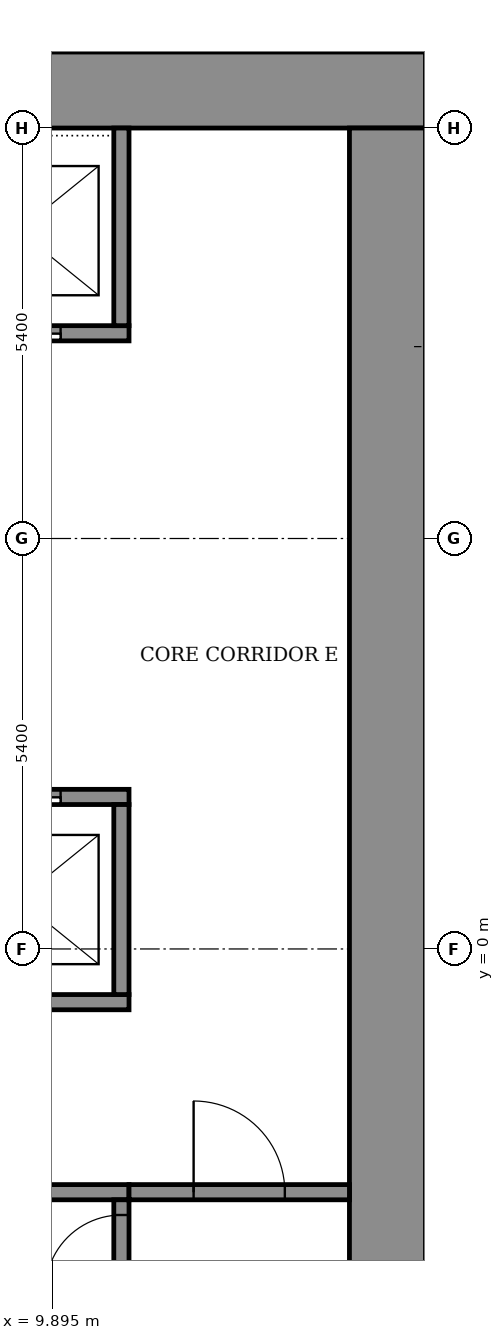
"""IFC4 building model, lengths in metres.
Left out: names, types, materials, properties, quantities, classifications, styles, units other than length and angle.
Written with IfcOpenShell. Run it as: python <this file> out.ifc"""

import sys

from ifc_helpers import new_model, si_unit, direction, frame, frame_2d, origin, place, context, subcontext, project, spatial, rectangle, extrude, element, fill, save


model = new_model("IFC4")
c1 = context("Model", 3, precision=1e-05, world=origin(), true_north=direction((0.0, 1.0)))
c2 = subcontext(c1, "Body", "Model", "MODEL_VIEW")
j1 = project(units=[si_unit("LENGTHUNIT", "METRE"), si_unit("PLANEANGLEUNIT", "RADIAN")], contexts=[c1])
p1 = place(None, origin())
s1 = spatial("IfcSite", under=j1, at=p1, CompositionType="ELEMENT")
p2 = place(p1, origin())
s2 = spatial("IfcBuilding", under=s1, at=p2, CompositionType="ELEMENT")
p3 = place(p2, frame((0.0, 0.0, 119.9)))
s3 = spatial("IfcBuildingStorey", under=s2, at=p3, CompositionType="ELEMENT", Elevation=119.9)
p4 = place(p3, frame((-14.8, 11.3, 0.0), z_axis=(0.0, 0.0, 1.0), x_axis=(1.0, 0.0, 0.0)))
e1 = element("IfcWall", 1, at=p4, inside=s3, PredefinedType="SHEAR", context=c2, shape_type="SweptSolid", body=[
    extrude(rectangle(XDim=29.6, YDim=1.0, at=frame_2d((14.8, 0.0))), origin(), (0.0, 0.0, 1.0), 5.6),
])
p5 = place(p3, frame((14.3, -10.8, 0.0), z_axis=(0.0, 0.0, 1.0), x_axis=(0.0, 1.0, 0.0)))
e2 = element("IfcWall", 2, at=p5, inside=s3, PredefinedType="SHEAR", context=c2, shape_type="SweptSolid", body=[
    extrude(rectangle(XDim=21.6, YDim=1.0, at=frame_2d((10.8, 0.0))), origin(), (0.0, 0.0, 1.0), 5.6),
])
p6 = place(p5, frame((1.2, 0.0, 0.0)))
e3 = element("IfcOpeningElement", 3, at=p6, cuts=e2, PredefinedType="OPENING", context=c2, shape_type="SweptSolid", body=[
    extrude(rectangle(XDim=1.2, YDim=2.1, at=frame_2d((0.6, 1.05))), frame((0.0, 0.51, 0.0), z_axis=(0.0, -1.0, 0.0), x_axis=(1.0, 0.0, 0.0)), (0.0, 0.0, 1.0), 1.02),
])
p7 = place(p3, frame((-10.9, -3.2, 0.0), z_axis=(0.0, 0.0, 1.0), x_axis=(1.0, 0.0, 0.0)))
e4 = element("IfcWall", 4, at=p7, inside=s3, PredefinedType="SHEAR", context=c2, shape_type="SweptSolid", body=[
    extrude(rectangle(XDim=21.8, YDim=0.2, at=frame_2d((10.9, 0.0))), origin(), (0.0, 0.0, 1.0), 5.05),
])
p8 = place(p7, frame((1.075, 0.0, 0.0)))
e5 = element("IfcOpeningElement", 5, at=p8, cuts=e4, PredefinedType="OPENING", context=c2, shape_type="SweptSolid", body=[
    extrude(rectangle(XDim=1.1, YDim=2.1, at=frame_2d((0.55, 1.05))), frame((0.0, 0.11, 0.0), z_axis=(0.0, -1.0, 0.0), x_axis=(1.0, 0.0, 0.0)), (0.0, 0.0, 1.0), 0.22),
])
p9 = place(p7, frame((10.325, 0.0, 0.0)))
e6 = element("IfcOpeningElement", 6, at=p9, cuts=e4, PredefinedType="OPENING", context=c2, shape_type="SweptSolid", body=[
    extrude(rectangle(XDim=1.1, YDim=2.1, at=frame_2d((0.55, 1.05))), frame((0.0, 0.11, 0.0), z_axis=(0.0, -1.0, 0.0), x_axis=(1.0, 0.0, 0.0)), (0.0, 0.0, 1.0), 0.22),
])
p10 = place(p7, frame((19.625, 0.0, 0.0)))
e7 = element("IfcOpeningElement", 7, at=p10, cuts=e4, PredefinedType="OPENING", context=c2, shape_type="SweptSolid", body=[
    extrude(rectangle(XDim=1.1, YDim=2.1, at=frame_2d((0.55, 1.05))), frame((0.0, 0.11, 0.0), z_axis=(0.0, -1.0, 0.0), x_axis=(1.0, 0.0, 0.0)), (0.0, 0.0, 1.0), 0.22),
])
p11 = place(p7, frame((5.7, 0.0, 0.0)))
e8 = element("IfcOpeningElement", 8, at=p11, cuts=e4, PredefinedType="OPENING", context=c2, shape_type="SweptSolid", body=[
    extrude(rectangle(XDim=1.1, YDim=2.1, at=frame_2d((0.55, 1.05))), frame((0.0, 0.11, 0.0), z_axis=(0.0, -1.0, 0.0), x_axis=(1.0, 0.0, 0.0)), (0.0, 0.0, 1.0), 0.22),
])
p12 = place(p7, frame((14.975, 0.0, 0.0)))
e9 = element("IfcOpeningElement", 9, at=p12, cuts=e4, PredefinedType="OPENING", context=c2, shape_type="SweptSolid", body=[
    extrude(rectangle(XDim=1.1, YDim=2.1, at=frame_2d((0.55, 1.05))), frame((0.0, 0.11, 0.0), z_axis=(0.0, -1.0, 0.0), x_axis=(1.0, 0.0, 0.0)), (0.0, 0.0, 1.0), 0.22),
])
p13 = place(p3, frame((-10.9, -0.7, 0.0), z_axis=(0.0, 0.0, 1.0), x_axis=(1.0, 0.0, 0.0)))
e10 = element("IfcWall", 10, at=p13, inside=s3, PredefinedType="SHEAR", context=c2, shape_type="SweptSolid", body=[
    extrude(rectangle(XDim=21.8, YDim=0.2, at=frame_2d((10.9, 0.0))), origin(), (0.0, 0.0, 1.0), 5.05),
])
p14 = place(p3, frame((-10.9, 2.0, 0.0), z_axis=(0.0, 0.0, 1.0), x_axis=(1.0, 0.0, 0.0)))
e11 = element("IfcWall", 11, at=p14, inside=s3, PredefinedType="SHEAR", context=c2, shape_type="SweptSolid", body=[
    extrude(rectangle(XDim=21.8, YDim=0.2, at=frame_2d((10.9, 0.0))), origin(), (0.0, 0.0, 1.0), 5.05),
])
p15 = place(p14, frame((0.9, 0.0, 0.0)))
e12 = element("IfcOpeningElement", 12, at=p15, cuts=e11, PredefinedType="OPENING", context=c2, shape_type="SweptSolid", body=[
    extrude(rectangle(XDim=1.1, YDim=2.1, at=frame_2d((0.55, 1.05))), frame((0.0, 0.11, 0.0), z_axis=(0.0, -1.0, 0.0), x_axis=(1.0, 0.0, 0.0)), (0.0, 0.0, 1.0), 0.22),
])
p16 = place(p14, frame((3.6, 0.0, 0.0)))
e13 = element("IfcOpeningElement", 13, at=p16, cuts=e11, PredefinedType="OPENING", context=c2, shape_type="SweptSolid", body=[
    extrude(rectangle(XDim=1.1, YDim=2.1, at=frame_2d((0.55, 1.05))), frame((0.0, 0.11, 0.0), z_axis=(0.0, -1.0, 0.0), x_axis=(1.0, 0.0, 0.0)), (0.0, 0.0, 1.0), 0.22),
])
p17 = place(p14, frame((6.3, 0.0, 0.0)))
e14 = element("IfcOpeningElement", 14, at=p17, cuts=e11, PredefinedType="OPENING", context=c2, shape_type="SweptSolid", body=[
    extrude(rectangle(XDim=1.1, YDim=2.1, at=frame_2d((0.55, 1.05))), frame((0.0, 0.11, 0.0), z_axis=(0.0, -1.0, 0.0), x_axis=(1.0, 0.0, 0.0)), (0.0, 0.0, 1.0), 0.22),
])
p18 = place(p14, frame((9.0, 0.0, 0.0)))
e15 = element("IfcOpeningElement", 15, at=p18, cuts=e11, PredefinedType="OPENING", context=c2, shape_type="SweptSolid", body=[
    extrude(rectangle(XDim=1.1, YDim=2.1, at=frame_2d((0.55, 1.05))), frame((0.0, 0.11, 0.0), z_axis=(0.0, -1.0, 0.0), x_axis=(1.0, 0.0, 0.0)), (0.0, 0.0, 1.0), 0.22),
])
p19 = place(p14, frame((11.7, 0.0, 0.0)))
e16 = element("IfcOpeningElement", 16, at=p19, cuts=e11, PredefinedType="OPENING", context=c2, shape_type="SweptSolid", body=[
    extrude(rectangle(XDim=1.1, YDim=2.1, at=frame_2d((0.55, 1.05))), frame((0.0, 0.11, 0.0), z_axis=(0.0, -1.0, 0.0), x_axis=(1.0, 0.0, 0.0)), (0.0, 0.0, 1.0), 0.22),
])
p20 = place(p14, frame((14.4, 0.0, 0.0)))
e17 = element("IfcOpeningElement", 17, at=p20, cuts=e11, PredefinedType="OPENING", context=c2, shape_type="SweptSolid", body=[
    extrude(rectangle(XDim=1.1, YDim=2.1, at=frame_2d((0.55, 1.05))), frame((0.0, 0.11, 0.0), z_axis=(0.0, -1.0, 0.0), x_axis=(1.0, 0.0, 0.0)), (0.0, 0.0, 1.0), 0.22),
])
p21 = place(p14, frame((17.1, 0.0, 0.0)))
e18 = element("IfcOpeningElement", 18, at=p21, cuts=e11, PredefinedType="OPENING", context=c2, shape_type="SweptSolid", body=[
    extrude(rectangle(XDim=1.1, YDim=2.1, at=frame_2d((0.55, 1.05))), frame((0.0, 0.11, 0.0), z_axis=(0.0, -1.0, 0.0), x_axis=(1.0, 0.0, 0.0)), (0.0, 0.0, 1.0), 0.22),
])
p22 = place(p14, frame((19.8, 0.0, 0.0)))
e19 = element("IfcOpeningElement", 19, at=p22, cuts=e11, PredefinedType="OPENING", context=c2, shape_type="SweptSolid", body=[
    extrude(rectangle(XDim=1.1, YDim=2.1, at=frame_2d((0.55, 1.05))), frame((0.0, 0.11, 0.0), z_axis=(0.0, -1.0, 0.0), x_axis=(1.0, 0.0, 0.0)), (0.0, 0.0, 1.0), 0.22),
])
p23 = place(p3, frame((-10.9, 8.1, 0.0), z_axis=(0.0, 0.0, 1.0), x_axis=(1.0, 0.0, 0.0)))
e20 = element("IfcWall", 20, at=p23, inside=s3, PredefinedType="SHEAR", context=c2, shape_type="SweptSolid", body=[
    extrude(rectangle(XDim=21.8, YDim=0.2, at=frame_2d((10.9, 0.0))), origin(), (0.0, 0.0, 1.0), 5.05),
])
p24 = place(p23, frame((0.9, 0.0, 0.0)))
e21 = element("IfcOpeningElement", 21, at=p24, cuts=e20, PredefinedType="OPENING", context=c2, shape_type="SweptSolid", body=[
    extrude(rectangle(XDim=1.1, YDim=2.1, at=frame_2d((0.55, 1.05))), frame((0.0, 0.11, 0.0), z_axis=(0.0, -1.0, 0.0), x_axis=(1.0, 0.0, 0.0)), (0.0, 0.0, 1.0), 0.22),
])
p25 = place(p23, frame((3.6, 0.0, 0.0)))
e22 = element("IfcOpeningElement", 22, at=p25, cuts=e20, PredefinedType="OPENING", context=c2, shape_type="SweptSolid", body=[
    extrude(rectangle(XDim=1.1, YDim=2.1, at=frame_2d((0.55, 1.05))), frame((0.0, 0.11, 0.0), z_axis=(0.0, -1.0, 0.0), x_axis=(1.0, 0.0, 0.0)), (0.0, 0.0, 1.0), 0.22),
])
p26 = place(p23, frame((6.3, 0.0, 0.0)))
e23 = element("IfcOpeningElement", 23, at=p26, cuts=e20, PredefinedType="OPENING", context=c2, shape_type="SweptSolid", body=[
    extrude(rectangle(XDim=1.1, YDim=2.1, at=frame_2d((0.55, 1.05))), frame((0.0, 0.11, 0.0), z_axis=(0.0, -1.0, 0.0), x_axis=(1.0, 0.0, 0.0)), (0.0, 0.0, 1.0), 0.22),
])
p27 = place(p23, frame((9.0, 0.0, 0.0)))
e24 = element("IfcOpeningElement", 24, at=p27, cuts=e20, PredefinedType="OPENING", context=c2, shape_type="SweptSolid", body=[
    extrude(rectangle(XDim=1.1, YDim=2.1, at=frame_2d((0.55, 1.05))), frame((0.0, 0.11, 0.0), z_axis=(0.0, -1.0, 0.0), x_axis=(1.0, 0.0, 0.0)), (0.0, 0.0, 1.0), 0.22),
])
p28 = place(p23, frame((11.7, 0.0, 0.0)))
e25 = element("IfcOpeningElement", 25, at=p28, cuts=e20, PredefinedType="OPENING", context=c2, shape_type="SweptSolid", body=[
    extrude(rectangle(XDim=1.1, YDim=2.1, at=frame_2d((0.55, 1.05))), frame((0.0, 0.11, 0.0), z_axis=(0.0, -1.0, 0.0), x_axis=(1.0, 0.0, 0.0)), (0.0, 0.0, 1.0), 0.22),
])
p29 = place(p23, frame((14.4, 0.0, 0.0)))
e26 = element("IfcOpeningElement", 26, at=p29, cuts=e20, PredefinedType="OPENING", context=c2, shape_type="SweptSolid", body=[
    extrude(rectangle(XDim=1.1, YDim=2.1, at=frame_2d((0.55, 1.05))), frame((0.0, 0.11, 0.0), z_axis=(0.0, -1.0, 0.0), x_axis=(1.0, 0.0, 0.0)), (0.0, 0.0, 1.0), 0.22),
])
p30 = place(p23, frame((17.1, 0.0, 0.0)))
e27 = element("IfcOpeningElement", 27, at=p30, cuts=e20, PredefinedType="OPENING", context=c2, shape_type="SweptSolid", body=[
    extrude(rectangle(XDim=1.1, YDim=2.1, at=frame_2d((0.55, 1.05))), frame((0.0, 0.11, 0.0), z_axis=(0.0, -1.0, 0.0), x_axis=(1.0, 0.0, 0.0)), (0.0, 0.0, 1.0), 0.22),
])
p31 = place(p23, frame((19.8, 0.0, 0.0)))
e28 = element("IfcOpeningElement", 28, at=p31, cuts=e20, PredefinedType="OPENING", context=c2, shape_type="SweptSolid", body=[
    extrude(rectangle(XDim=1.1, YDim=2.1, at=frame_2d((0.55, 1.05))), frame((0.0, 0.11, 0.0), z_axis=(0.0, -1.0, 0.0), x_axis=(1.0, 0.0, 0.0)), (0.0, 0.0, 1.0), 0.22),
])
p32 = place(p3, frame((10.8, -10.8, 0.0), z_axis=(0.0, 0.0, 1.0), x_axis=(0.0, 1.0, 0.0)))
e29 = element("IfcWall", 29, at=p32, inside=s3, PredefinedType="SHEAR", context=c2, shape_type="SweptSolid", body=[
    extrude(rectangle(XDim=7.5, YDim=0.2, at=frame_2d((3.75, 0.0))), origin(), (0.0, 0.0, 1.0), 5.05),
])
p33 = place(p32, frame((6.3, 0.0, 0.0)))
e30 = element("IfcOpeningElement", 30, at=p33, cuts=e29, PredefinedType="OPENING", context=c2, shape_type="SweptSolid", body=[
    extrude(rectangle(XDim=1.0, YDim=2.1, at=frame_2d((0.5, 1.05))), frame((0.0, 0.11, 0.0), z_axis=(0.0, -1.0, 0.0), x_axis=(1.0, 0.0, 0.0)), (0.0, 0.0, 1.0), 0.22),
])
p34 = place(p3, frame((10.8, -0.6, 0.0), z_axis=(0.0, 0.0, 1.0), x_axis=(0.0, 1.0, 0.0)))
e31 = element("IfcWall", 31, at=p34, inside=s3, PredefinedType="SHEAR", context=c2, shape_type="SweptSolid", body=[
    extrude(rectangle(XDim=2.5, YDim=0.2, at=frame_2d((1.25, 0.0))), origin(), (0.0, 0.0, 1.0), 5.05),
])
p35 = place(p3, frame((10.8, 8.2, 0.0), z_axis=(0.0, 0.0, 1.0), x_axis=(0.0, 1.0, 0.0)))
e32 = element("IfcWall", 32, at=p35, inside=s3, PredefinedType="SHEAR", context=c2, shape_type="SweptSolid", body=[
    extrude(rectangle(XDim=2.6, YDim=0.2, at=frame_2d((1.3, 0.0))), origin(), (0.0, 0.0, 1.0), 5.05),
])
p36 = place(p3, frame((10.9, -3.2, 0.0), z_axis=(0.0, 0.0, 1.0), x_axis=(1.0, 0.0, 0.0)))
e33 = element("IfcWall", 33, at=p36, inside=s3, PredefinedType="STANDARD", context=c2, shape_type="SweptSolid", body=[
    extrude(rectangle(XDim=2.9, YDim=0.2, at=frame_2d((1.45, 0.0))), origin(), (0.0, 0.0, 1.0), 5.05),
])
p37 = place(p36, frame((0.85, 0.0, 0.0)))
e34 = element("IfcOpeningElement", 34, at=p37, cuts=e33, PredefinedType="OPENING", context=c2, shape_type="SweptSolid", body=[
    extrude(rectangle(XDim=1.2, YDim=2.1, at=frame_2d((0.6, 1.05))), frame((0.0, 0.11, 0.0), z_axis=(0.0, -1.0, 0.0), x_axis=(1.0, 0.0, 0.0)), (0.0, 0.0, 1.0), 0.22),
])
p38 = place(p22, origin())
e35 = element("IfcDoor", 35, at=p38, inside=s3, OperationType="SLIDING_TO_LEFT", PredefinedType="DOOR", context=c2, shape_type="SweptSolid", body=[
    extrude(rectangle(XDim=1.1, YDim=2.1, at=frame_2d((0.55, 1.05))), frame((0.0, 0.025, 0.0), z_axis=(0.0, -1.0, 0.0), x_axis=(1.0, 0.0, 0.0)), (0.0, 0.0, 1.0), 0.05),
])
fill(e19, e35)
p39 = place(p31, origin())
e36 = element("IfcDoor", 36, at=p39, inside=s3, OperationType="SLIDING_TO_LEFT", PredefinedType="DOOR", context=c2, shape_type="SweptSolid", body=[
    extrude(rectangle(XDim=1.1, YDim=2.1, at=frame_2d((0.55, 1.05))), frame((0.0, 0.025, 0.0), z_axis=(0.0, -1.0, 0.0), x_axis=(1.0, 0.0, 0.0)), (0.0, 0.0, 1.0), 0.05),
])
fill(e28, e36)
p40 = place(p37, origin())
e37 = element("IfcDoor", 37, at=p40, inside=s3, OperationType="SINGLE_SWING_LEFT", PredefinedType="DOOR", context=c2, shape_type="SweptSolid", body=[
    extrude(rectangle(XDim=1.2, YDim=2.1, at=frame_2d((0.6, 1.05))), frame((0.0, 0.025, 0.0), z_axis=(0.0, -1.0, 0.0), x_axis=(1.0, 0.0, 0.0)), (0.0, 0.0, 1.0), 0.05),
])
fill(e34, e37)
p41 = place(p33, origin())
e38 = element("IfcDoor", 38, at=p41, inside=s3, OperationType="SINGLE_SWING_RIGHT", PredefinedType="DOOR", context=c2, shape_type="SweptSolid", body=[
    extrude(rectangle(XDim=1.0, YDim=2.1, at=frame_2d((0.5, 1.05))), frame((0.0, 0.025, 0.0), z_axis=(0.0, -1.0, 0.0), x_axis=(1.0, 0.0, 0.0)), (0.0, 0.0, 1.0), 0.05),
])
fill(e30, e38)
save(model, sys.argv[1])
